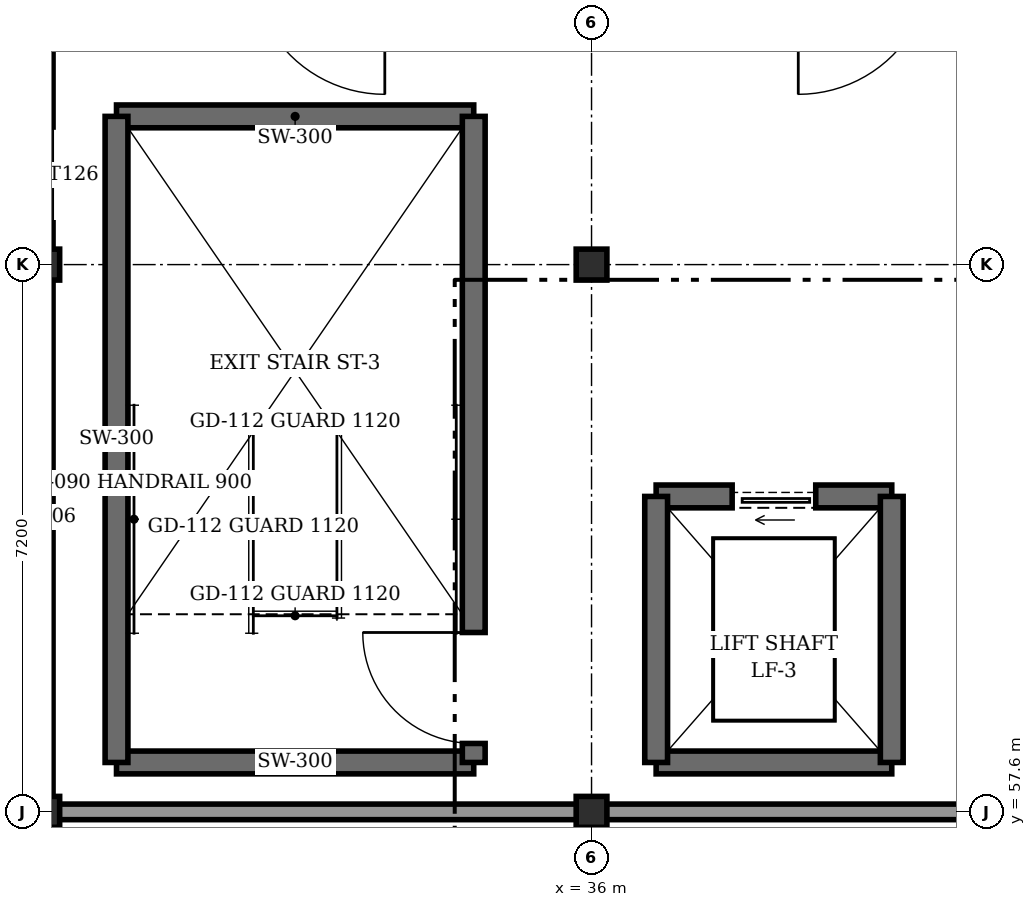
"""IFC4 building model, lengths in metres.
Left out: names, types, materials, properties, quantities, classifications, styles, units other than length and angle.
Written with IfcOpenShell. Run it as: python <this file> out.ifc"""

import sys

from ifc_helpers import new_model, si_unit, direction, frame, frame_2d, origin, origin_2d, place, context, subcontext, project, spatial, rectangle, i_section, extrude, element, fill, save


model = new_model("IFC4")
c1 = context("Model", 3, precision=1e-05, world=origin(), true_north=direction((0.0, 1.0)))
c2 = subcontext(c1, "Body", "Model", "MODEL_VIEW")
j1 = project(units=[si_unit("LENGTHUNIT", "METRE"), si_unit("PLANEANGLEUNIT", "RADIAN")], contexts=[c1])
p1 = place(None, origin())
s1 = spatial("IfcSite", under=j1, at=p1, CompositionType="ELEMENT")
p2 = place(p1, origin())
s2 = spatial("IfcBuilding", under=s1, at=p2, CompositionType="ELEMENT")
p3 = place(p2, frame((0.0, 0.0, 14.4)))
s3 = spatial("IfcBuildingStorey", under=s2, at=p3, CompositionType="ELEMENT", Elevation=14.4)
for number, where, z_axis, x_axis in (
    (1, (28.8, 57.6, 0.0), (0.0, 0.0, 1.0), (1.0, 0.0, 0.0)),
    (2, (28.8, 64.8, 0.0), (0.0, 0.0, 1.0), (1.0, 0.0, 0.0)),
    (3, (36.0, 57.6, 0.0), (0.0, 0.0, 1.0), (1.0, 0.0, 0.0)),
    (4, (36.0, 64.8, 0.0), (0.0, 0.0, 1.0), (1.0, 0.0, 0.0)),
):
    element("IfcColumn", number, at=place(p3, frame(where, z_axis=z_axis, x_axis=x_axis)), inside=s3, PredefinedType="COLUMN", context=c2, shape_type="SweptSolid", body=[
        extrude(i_section(OverallWidth=0.404, OverallDepth=0.407, WebThickness=0.027, FlangeThickness=0.044, at=origin_2d()), origin(), (0.0, 0.0, 1.0), 3.6),
    ])
p4 = place(p3, frame((28.8, 57.6, 0.0), z_axis=(0.0, 0.0, 1.0), x_axis=(1.0, 0.0, 0.0)))
e5 = element("IfcWall", 5, at=p4, inside=s3, PredefinedType="STANDARD", context=c2, shape_type="SweptSolid", body=[
    extrude(rectangle(XDim=28.8, YDim=0.205, at=frame_2d((14.4, 0.0))), origin(), (0.0, 0.0, 1.0), 2.42),
])
p5 = place(p3, frame((28.8, 99.0, 0.0), z_axis=(0.0, 0.0, 1.0), x_axis=(0.0, -1.0, 0.0)))
e6 = element("IfcWall", 6, at=p5, inside=s3, PredefinedType="STANDARD", context=c2, shape_type="SweptSolid", body=[
    extrude(rectangle(XDim=41.4, YDim=0.23, at=frame_2d((20.7, 0.0))), origin(), (0.0, 0.0, 1.0), 2.42),
])
p6 = place(p5, frame((32.39, 0.0, 0.95)))
e7 = element("IfcOpeningElement", 7, at=p6, cuts=e6, PredefinedType="OPENING", context=c2, shape_type="SweptSolid", body=[
    extrude(rectangle(XDim=1.26, YDim=1.38, at=frame_2d((0.63, 0.69))), frame((0.0, 0.125, 0.0), z_axis=(0.0, -1.0, 0.0), x_axis=(1.0, 0.0, 0.0)), (0.0, 0.0, 1.0), 0.25),
])
p7 = place(p5, frame((25.19, 0.0, 0.95)))
e8 = element("IfcOpeningElement", 8, at=p7, cuts=e6, PredefinedType="OPENING", context=c2, shape_type="SweptSolid", body=[
    extrude(rectangle(XDim=1.26, YDim=1.38, at=frame_2d((0.63, 0.69))), frame((0.0, 0.125, 0.0), z_axis=(0.0, -1.0, 0.0), x_axis=(1.0, 0.0, 0.0)), (0.0, 0.0, 1.0), 0.25),
])
p8 = place(p5, frame((17.99, 0.0, 0.95)))
e9 = element("IfcOpeningElement", 9, at=p8, cuts=e6, PredefinedType="OPENING", context=c2, shape_type="SweptSolid", body=[
    extrude(rectangle(XDim=1.26, YDim=1.38, at=frame_2d((0.63, 0.69))), frame((0.0, 0.125, 0.0), z_axis=(0.0, -1.0, 0.0), x_axis=(1.0, 0.0, 0.0)), (0.0, 0.0, 1.0), 0.25),
])
p9 = place(p5, frame((0.84, 0.0, 0.95)))
e10 = element("IfcOpeningElement", 10, at=p9, cuts=e6, PredefinedType="OPENING", context=c2, shape_type="SweptSolid", body=[
    extrude(rectangle(XDim=1.26, YDim=1.38, at=frame_2d((0.63, 0.69))), frame((0.0, 0.125, 0.0), z_axis=(0.0, -1.0, 0.0), x_axis=(1.0, 0.0, 0.0)), (0.0, 0.0, 1.0), 0.25),
])
for number, where, z_axis, x_axis in (
    (11, (29.75, 58.25, 0.0), (0.0, 0.0, 1.0), (1.0, 0.0, 0.0)),
    (12, (34.45, 66.75, 0.0), (0.0, 0.0, 1.0), (-1.0, 0.0, 0.0)),
):
    element("IfcWall", number, at=place(p3, frame(where, z_axis=z_axis, x_axis=x_axis)), inside=s3, PredefinedType="SHEAR", context=c2, shape_type="SweptSolid", body=[
        extrude(rectangle(XDim=4.7, YDim=0.3, at=frame_2d((2.35, 0.0))), origin(), (0.0, 0.0, 1.0), 3.36),
    ])
p10 = place(p3, frame((29.75, 66.75, 0.0), z_axis=(0.0, 0.0, 1.0), x_axis=(0.0, -1.0, 0.0)))
e13 = element("IfcWall", 13, at=p10, inside=s3, PredefinedType="SHEAR", context=c2, shape_type="SweptSolid", body=[
    extrude(rectangle(XDim=8.5, YDim=0.3, at=frame_2d((4.25, 0.0))), origin(), (0.0, 0.0, 1.0), 3.36),
])
p11 = place(p3, frame((34.45, 58.25, 0.0), z_axis=(0.0, 0.0, 1.0), x_axis=(0.0, 1.0, 0.0)))
e14 = element("IfcWall", 14, at=p11, inside=s3, PredefinedType="SHEAR", context=c2, shape_type="SweptSolid", body=[
    extrude(rectangle(XDim=8.5, YDim=0.3, at=frame_2d((4.25, 0.0))), origin(), (0.0, 0.0, 1.0), 3.36),
])
p12 = place(p11, frame((0.25, 0.0, 0.0)))
e15 = element("IfcOpeningElement", 15, at=p12, cuts=e14, PredefinedType="OPENING", context=c2, shape_type="SweptSolid", body=[
    extrude(rectangle(XDim=1.46, YDim=2.24, at=frame_2d((0.73, 1.12))), frame((0.0, 0.16, 0.0), z_axis=(0.0, -1.0, 0.0), x_axis=(1.0, 0.0, 0.0)), (0.0, 0.0, 1.0), 0.32),
])
p13 = place(p3, frame((36.85, 58.25, 0.0), z_axis=(0.0, 0.0, 1.0), x_axis=(1.0, 0.0, 0.0)))
e16 = element("IfcWall", 16, at=p13, inside=s3, PredefinedType="SHEAR", context=c2, shape_type="SweptSolid", body=[
    extrude(rectangle(XDim=3.1, YDim=0.3, at=frame_2d((1.55, 0.0))), origin(), (0.0, 0.0, 1.0), 3.36),
])
p14 = place(p3, frame((39.95, 61.75, 0.0), z_axis=(0.0, 0.0, 1.0), x_axis=(-1.0, 0.0, 0.0)))
e17 = element("IfcWall", 17, at=p14, inside=s3, PredefinedType="SHEAR", context=c2, shape_type="SweptSolid", body=[
    extrude(rectangle(XDim=3.1, YDim=0.3, at=frame_2d((1.55, 0.0))), origin(), (0.0, 0.0, 1.0), 3.36),
])
p15 = place(p14, frame((1.0, 0.0, 0.0)))
e18 = element("IfcOpeningElement", 18, at=p15, cuts=e17, PredefinedType="OPENING", context=c2, shape_type="SweptSolid", body=[
    extrude(rectangle(XDim=1.1, YDim=2.22, at=frame_2d((0.55, 1.11))), frame((0.0, 0.16, 0.0), z_axis=(0.0, -1.0, 0.0), x_axis=(1.0, 0.0, 0.0)), (0.0, 0.0, 1.0), 0.32),
])
for number, where, z_axis, x_axis in (
    (19, (36.85, 61.75, 0.0), (0.0, 0.0, 1.0), (0.0, -1.0, 0.0)),
    (20, (39.95, 58.25, 0.0), (0.0, 0.0, 1.0), (0.0, 1.0, 0.0)),
):
    element("IfcWall", number, at=place(p3, frame(where, z_axis=z_axis, x_axis=x_axis)), inside=s3, PredefinedType="SHEAR", context=c2, shape_type="SweptSolid", body=[
        extrude(rectangle(XDim=3.5, YDim=0.3, at=frame_2d((1.75, 0.0))), origin(), (0.0, 0.0, 1.0), 3.36),
    ])
p16 = place(p12, origin())
e21 = element("IfcDoor", 21, at=p16, inside=s3, OperationType="SINGLE_SWING_RIGHT", PredefinedType="DOOR", context=c2, shape_type="SweptSolid", body=[
    extrude(rectangle(XDim=1.46, YDim=2.24, at=frame_2d((0.73, 1.12))), frame((0.0, 0.025, 0.0), z_axis=(0.0, -1.0, 0.0), x_axis=(1.0, 0.0, 0.0)), (0.0, 0.0, 1.0), 0.05),
])
fill(e15, e21)
p17 = place(p15, origin())
e22 = element("IfcDoor", 22, at=p17, inside=s3, OperationType="SLIDING_TO_LEFT", PredefinedType="DOOR", context=c2, shape_type="SweptSolid", body=[
    extrude(rectangle(XDim=1.1, YDim=2.22, at=frame_2d((0.55, 1.11))), frame((0.0, 0.025, 0.0), z_axis=(0.0, -1.0, 0.0), x_axis=(1.0, 0.0, 0.0)), (0.0, 0.0, 1.0), 0.05),
])
fill(e18, e22)
save(model, sys.argv[1])
